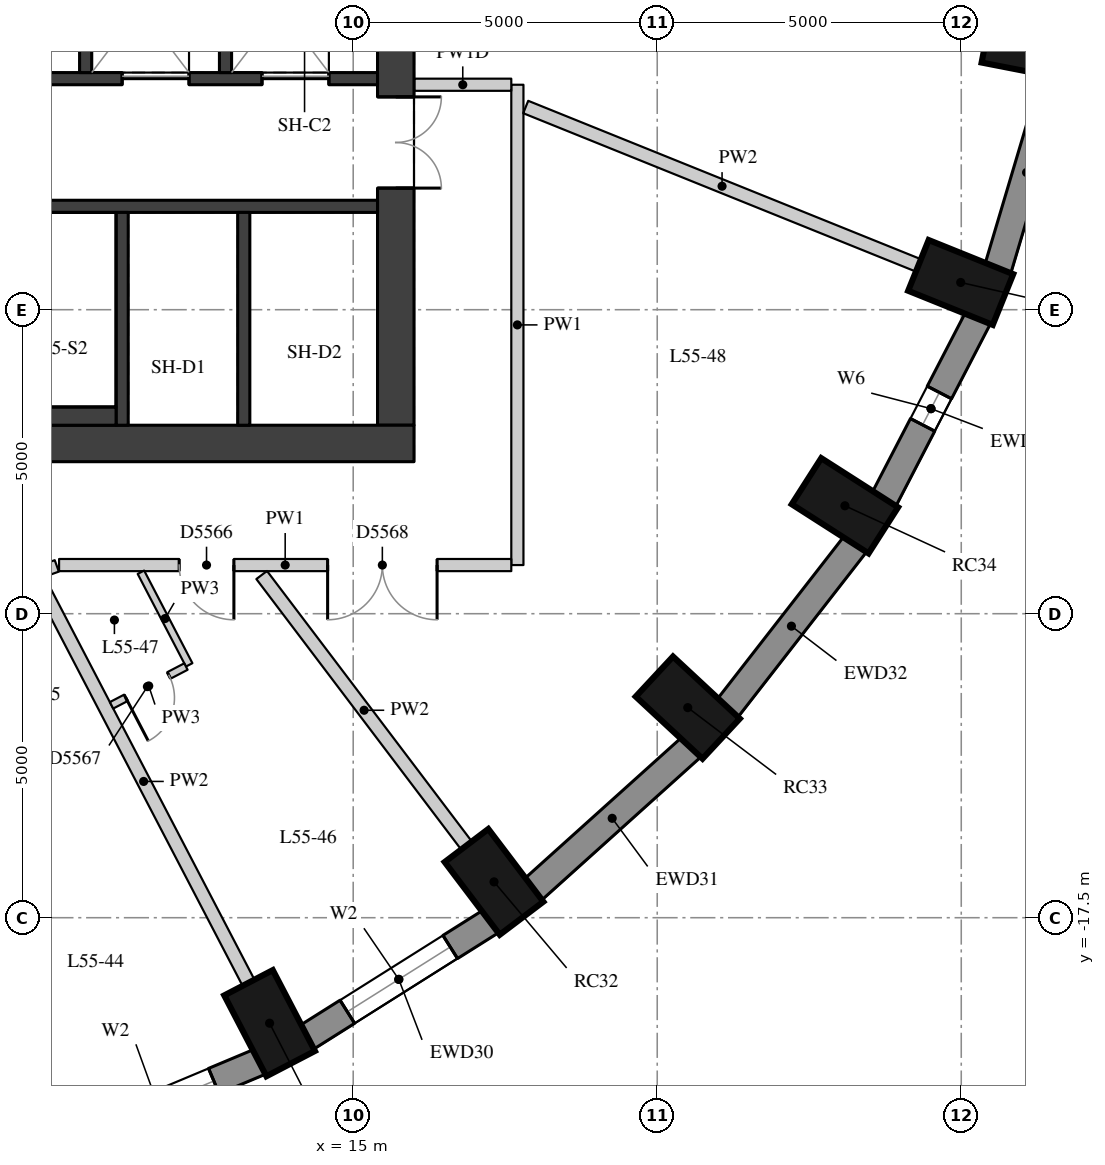
"""IFC4 building model, lengths in metres.
Left out: names, types, materials, properties, quantities, classifications, styles, units other than length and angle.
Written with IfcOpenShell. Run it as: python <this file> out.ifc"""

import sys

from ifc_helpers import new_model, si_unit, direction, frame, frame_2d, origin, origin_2d, place, context, subcontext, project, spatial, rectangle, extrude, element, fill, save


model = new_model("IFC4")
c1 = context("Model", 3, precision=1e-05, world=origin(), true_north=direction((0.0, 1.0)))
c2 = subcontext(c1, "Body", "Model", "MODEL_VIEW")
j1 = project(units=[si_unit("LENGTHUNIT", "METRE"), si_unit("PLANEANGLEUNIT", "RADIAN")], contexts=[c1])
p1 = place(None, origin())
s1 = spatial("IfcSite", under=j1, at=p1, CompositionType="ELEMENT")
p2 = place(p1, origin())
s2 = spatial("IfcBuilding", under=s1, at=p2, CompositionType="ELEMENT")
p3 = place(p2, frame((0.0, 0.0, 195.8)))
s3 = spatial("IfcBuildingStorey", under=s2, at=p3, CompositionType="ELEMENT", Elevation=195.8)
for number, where, z_axis, x_axis in (
    (1, (9.541, -20.948, 0.0), (0.0, 0.0, 1.0), (0.312, -0.95, 0.0)),
    (2, (13.625, -19.235, 0.0), (0.0, 0.0, 1.0), (0.462, -0.887, 0.0)),
    (3, (17.316, -16.911, 0.0), (0.0, 0.0, 1.0), (0.604, -0.797, 0.0)),
    (4, (20.502, -14.045, 0.0), (0.0, 0.0, 1.0), (0.732, -0.681, 0.0)),
    (5, (23.087, -10.725, 0.0), (0.0, 0.0, 1.0), (0.842, -0.539, 0.0)),
    (6, (24.991, -7.052, 0.0), (0.0, 0.0, 1.0), (0.927, -0.374, 0.0)),
    (7, (26.157, -3.137, 0.0), (0.0, 0.0, 1.0), (0.981, -0.192, 0.0)),
):
    element("IfcColumn", number, at=place(p3, frame(where, z_axis=z_axis, x_axis=x_axis)), inside=s3, PredefinedType="COLUMN", context=c2, shape_type="SweptSolid", body=[
        extrude(rectangle(XDim=1.5, YDim=0.9, at=origin_2d()), origin(), (0.0, 0.0, 1.0), 3.3),
    ])
p4 = place(p3, frame((10.103, -21.279, 0.0), z_axis=(0.0, 0.0, 1.0), x_axis=(0.922168222612, 0.386789050006, 0.0)))
e8 = element("IfcWall", 8, at=p4, inside=s3, PredefinedType="SOLIDWALL", context=c2, shape_type="SweptSolid", body=[
    extrude(rectangle(XDim=3.651, YDim=0.45, at=frame_2d((1.825, 0.0))), origin(), (0.0, 0.0, 1.0), 3.02),
])
p5 = place(p4, frame((0.825, 0.0, 0.4)))
e9 = element("IfcOpeningElement", 9, at=p5, cuts=e8, PredefinedType="OPENING", context=c2, shape_type="SweptSolid", body=[
    extrude(rectangle(XDim=2.0, YDim=1.75, at=frame_2d((1.0, 0.875))), frame((0.0, 0.235, 0.0), z_axis=(0.0, -1.0, 0.0), x_axis=(1.0, 0.0, 0.0)), (0.0, 0.0, 1.0), 0.47),
])
p6 = place(p3, frame((14.232, -19.47, 0.0), z_axis=(0.0, 0.0, 1.0), x_axis=(0.84614984472, 0.532945063098, 0.0)))
e10 = element("IfcWall", 10, at=p6, inside=s3, PredefinedType="SOLIDWALL", context=c2, shape_type="SweptSolid", body=[
    extrude(rectangle(XDim=3.586, YDim=0.45, at=frame_2d((1.793, 0.0))), origin(), (0.0, 0.0, 1.0), 3.02),
])
p7 = place(p6, frame((0.793, 0.0, 0.4)))
e11 = element("IfcOpeningElement", 11, at=p7, cuts=e10, PredefinedType="OPENING", context=c2, shape_type="SweptSolid", body=[
    extrude(rectangle(XDim=2.0, YDim=1.75, at=frame_2d((1.0, 0.875))), frame((0.0, 0.235, 0.0), z_axis=(0.0, -1.0, 0.0), x_axis=(1.0, 0.0, 0.0)), (0.0, 0.0, 1.0), 0.47),
])
p8 = place(p3, frame((17.953, -17.04, 0.0), z_axis=(0.0, 0.0, 1.0), x_axis=(0.743442727602, 0.668799604348, 0.0)))
e12 = element("IfcWall", 12, at=p8, inside=s3, PredefinedType="SOLIDWALL", context=c2, shape_type="SweptSolid", body=[
    extrude(rectangle(XDim=3.513, YDim=0.45, at=frame_2d((1.756, 0.0))), origin(), (0.0, 0.0, 1.0), 3.02),
])
p9 = place(p3, frame((21.151, -14.061, 0.0), z_axis=(0.0, 0.0, 1.0), x_axis=(0.614255239631, 0.789107407509, 0.0)))
e13 = element("IfcWall", 13, at=p9, inside=s3, PredefinedType="SOLIDWALL", context=c2, shape_type="SweptSolid", body=[
    extrude(rectangle(XDim=3.438, YDim=0.45, at=frame_2d((1.719, 0.0))), origin(), (0.0, 0.0, 1.0), 3.02),
])
p10 = place(p3, frame((23.727, -10.624, 0.0), z_axis=(0.0, 0.0, 1.0), x_axis=(0.460175500475, 0.887827972505, 0.0)))
e14 = element("IfcWall", 14, at=p10, inside=s3, PredefinedType="SOLIDWALL", context=c2, shape_type="SweptSolid", body=[
    extrude(rectangle(XDim=3.371, YDim=0.45, at=frame_2d((1.685, 0.0))), origin(), (0.0, 0.0, 1.0), 3.02),
])
p11 = place(p10, frame((1.385, 0.0, 0.4)))
e15 = element("IfcOpeningElement", 15, at=p11, cuts=e14, PredefinedType="OPENING", context=c2, shape_type="SweptSolid", body=[
    extrude(rectangle(XDim=0.6, YDim=1.75, at=frame_2d((0.3, 0.875))), frame((0.0, 0.235, 0.0), z_axis=(0.0, -1.0, 0.0), x_axis=(1.0, 0.0, 0.0)), (0.0, 0.0, 1.0), 0.47),
])
p12 = place(p3, frame((25.6, -6.834, 0.0), z_axis=(0.0, 0.0, 1.0), x_axis=(0.285444972963, 0.958395099847, 0.0)))
e16 = element("IfcWall", 16, at=p12, inside=s3, PredefinedType="SOLIDWALL", context=c2, shape_type="SweptSolid", body=[
    extrude(rectangle(XDim=3.32, YDim=0.45, at=frame_2d((1.66, 0.0))), origin(), (0.0, 0.0, 1.0), 3.02),
])
p13 = place(p3, frame((15.7, -9.4, 0.0), z_axis=(0.0, 0.0, 1.0), x_axis=(0.0, 1.0, 0.0)))
e17 = element("IfcWall", 17, at=p13, inside=s3, PredefinedType="SHEAR", context=c2, shape_type="SweptSolid", body=[
    extrude(rectangle(XDim=18.8, YDim=0.6, at=frame_2d((9.4, 0.0))), origin(), (0.0, 0.0, 1.0), 3.02),
])
p14 = place(p13, frame((13.4, 0.0, 0.0)))
e18 = element("IfcOpeningElement", 18, at=p14, cuts=e17, PredefinedType="OPENING", context=c2, shape_type="SweptSolid", body=[
    extrude(rectangle(XDim=1.5, YDim=2.1, at=frame_2d((0.75, 1.05))), frame((0.0, 0.31, 0.0), z_axis=(0.0, -1.0, 0.0), x_axis=(1.0, 0.0, 0.0)), (0.0, 0.0, 1.0), 0.62),
])
p15 = place(p13, frame((3.9, 0.0, 0.0)))
e19 = element("IfcOpeningElement", 19, at=p15, cuts=e17, PredefinedType="OPENING", context=c2, shape_type="SweptSolid", body=[
    extrude(rectangle(XDim=1.5, YDim=2.1, at=frame_2d((0.75, 1.05))), frame((0.0, 0.31, 0.0), z_axis=(0.0, -1.0, 0.0), x_axis=(1.0, 0.0, 0.0)), (0.0, 0.0, 1.0), 0.62),
])
p16 = place(p3, frame((4.0, -9.7, 0.0), z_axis=(0.0, 0.0, 1.0), x_axis=(1.0, 0.0, 0.0)))
e20 = element("IfcWall", 20, at=p16, inside=s3, PredefinedType="SHEAR", context=c2, shape_type="SweptSolid", body=[
    extrude(rectangle(XDim=12.0, YDim=0.6, at=frame_2d((6.0, 0.0))), origin(), (0.0, 0.0, 1.0), 3.02),
])
p17 = place(p3, frame((4.6, -3.7, 0.0), z_axis=(0.0, 0.0, 1.0), x_axis=(1.0, 0.0, 0.0)))
e21 = element("IfcWall", 21, at=p17, inside=s3, PredefinedType="SHEAR", context=c2, shape_type="SweptSolid", body=[
    extrude(rectangle(XDim=10.8, YDim=0.2, at=frame_2d((5.4, 0.0))), origin(), (0.0, 0.0, 1.0), 3.02),
])
p18 = place(p17, frame((6.6, 0.0, 0.0)))
e22 = element("IfcOpeningElement", 22, at=p18, cuts=e21, PredefinedType="OPENING", context=c2, shape_type="SweptSolid", body=[
    extrude(rectangle(XDim=1.1, YDim=2.1, at=frame_2d((0.55, 1.05))), frame((0.0, 0.11, 0.0), z_axis=(0.0, -1.0, 0.0), x_axis=(1.0, 0.0, 0.0)), (0.0, 0.0, 1.0), 0.22),
])
p19 = place(p17, frame((8.9, 0.0, 0.0)))
e23 = element("IfcOpeningElement", 23, at=p19, cuts=e21, PredefinedType="OPENING", context=c2, shape_type="SweptSolid", body=[
    extrude(rectangle(XDim=1.1, YDim=2.1, at=frame_2d((0.55, 1.05))), frame((0.0, 0.11, 0.0), z_axis=(0.0, -1.0, 0.0), x_axis=(1.0, 0.0, 0.0)), (0.0, 0.0, 1.0), 0.22),
])
p20 = place(p3, frame((4.6, -5.8, 0.0), z_axis=(0.0, 0.0, 1.0), x_axis=(1.0, 0.0, 0.0)))
e24 = element("IfcWall", 24, at=p20, inside=s3, PredefinedType="SHEAR", context=c2, shape_type="SweptSolid", body=[
    extrude(rectangle(XDim=10.8, YDim=0.2, at=frame_2d((5.4, 0.0))), origin(), (0.0, 0.0, 1.0), 3.02),
])
for number, where, z_axis, x_axis in (
    (25, (11.2, -9.4, 0.0), (0.0, 0.0, 1.0), (0.0, 1.0, 0.0)),
    (26, (13.2, -9.4, 0.0), (0.0, 0.0, 1.0), (0.0, 1.0, 0.0)),
):
    element("IfcWall", number, at=place(p3, frame(where, z_axis=z_axis, x_axis=x_axis)), inside=s3, PredefinedType="SHEAR", context=c2, shape_type="SweptSolid", body=[
        extrude(rectangle(XDim=3.5, YDim=0.2, at=frame_2d((1.75, 0.0))), origin(), (0.0, 0.0, 1.0), 3.02),
    ])
for number, where, z_axis, x_axis in (
    (27, (10.6, -3.6, 0.0), (0.0, 0.0, 1.0), (0.0, 1.0, 0.0)),
    (28, (12.9, -3.6, 0.0), (0.0, 0.0, 1.0), (0.0, 1.0, 0.0)),
):
    element("IfcWall", number, at=place(p3, frame(where, z_axis=z_axis, x_axis=x_axis)), inside=s3, PredefinedType="SHEAR", context=c2, shape_type="SweptSolid", body=[
        extrude(rectangle(XDim=2.5, YDim=0.2, at=frame_2d((1.25, 0.0))), origin(), (0.0, 0.0, 1.0), 3.02),
    ])
p21 = place(p3, frame((6.22, -9.25, 0.0), z_axis=(0.0, 0.0, 1.0), x_axis=(1.0, 0.0, 0.0)))
e29 = element("IfcWall", 29, at=p21, inside=s3, PredefinedType="PARTITIONING", context=c2, shape_type="SweptSolid", body=[
    extrude(rectangle(XDim=4.88, YDim=0.3, at=frame_2d((2.44, 0.0))), origin(), (0.0, 0.0, 1.0), 3.02),
])
p22 = place(p3, frame((17.7, -3.8, 0.0), z_axis=(0.0, 0.0, 1.0), x_axis=(0.0, -1.0, 0.0)))
e30 = element("IfcWall", 30, at=p22, inside=s3, PredefinedType="PARTITIONING", context=c2, shape_type="SweptSolid", body=[
    extrude(rectangle(XDim=7.9, YDim=0.2, at=frame_2d((3.95, 0.0))), origin(), (0.0, 0.0, 1.0), 3.02),
])
p23 = place(p3, frame((17.6, -11.7, 0.0), z_axis=(0.0, 0.0, 1.0), x_axis=(-1.0, 0.0, 0.0)))
e31 = element("IfcWall", 31, at=p23, inside=s3, PredefinedType="PARTITIONING", context=c2, shape_type="SweptSolid", body=[
    extrude(rectangle(XDim=7.437, YDim=0.2, at=frame_2d((3.719, 0.0))), origin(), (0.0, 0.0, 1.0), 3.02),
])
p24 = place(p23, frame((4.562, 0.0, 0.0)))
e32 = element("IfcOpeningElement", 32, at=p24, cuts=e31, PredefinedType="OPENING", context=c2, shape_type="SweptSolid", body=[
    extrude(rectangle(XDim=0.9, YDim=2.1, at=frame_2d((0.45, 1.05))), frame((0.0, 0.11, 0.0), z_axis=(0.0, -1.0, 0.0), x_axis=(1.0, 0.0, 0.0)), (0.0, 0.0, 1.0), 0.22),
])
p25 = place(p23, frame((1.22, 0.0, 0.0)))
e33 = element("IfcOpeningElement", 33, at=p25, cuts=e31, PredefinedType="OPENING", context=c2, shape_type="SweptSolid", body=[
    extrude(rectangle(XDim=1.8, YDim=2.1, at=frame_2d((0.9, 1.05))), frame((0.0, 0.11, 0.0), z_axis=(0.0, -1.0, 0.0), x_axis=(1.0, 0.0, 0.0)), (0.0, 0.0, 1.0), 0.22),
])
p26 = place(p3, frame((10.125, -11.714, 0.0), z_axis=(0.0, 0.0, 1.0), x_axis=(-0.940958661946, -0.338521486038, 0.0)))
e34 = element("IfcWall", 34, at=p26, inside=s3, PredefinedType="PARTITIONING", context=c2, shape_type="SweptSolid", body=[
    extrude(rectangle(XDim=6.594, YDim=0.2, at=frame_2d((3.297, 0.0))), origin(), (0.0, 0.0, 1.0), 3.02),
])
p27 = place(p26, frame((3.809, 0.0, 0.0)))
e35 = element("IfcOpeningElement", 35, at=p27, cuts=e34, PredefinedType="OPENING", context=c2, shape_type="SweptSolid", body=[
    extrude(rectangle(XDim=0.9, YDim=2.1, at=frame_2d((0.45, 1.05))), frame((0.0, 0.11, 0.0), z_axis=(0.0, -1.0, 0.0), x_axis=(1.0, 0.0, 0.0)), (0.0, 0.0, 1.0), 0.22),
])
p28 = place(p26, frame((0.706, 0.0, 0.0)))
e36 = element("IfcOpeningElement", 36, at=p28, cuts=e34, PredefinedType="OPENING", context=c2, shape_type="SweptSolid", body=[
    extrude(rectangle(XDim=0.9, YDim=2.1, at=frame_2d((0.45, 1.05))), frame((0.0, 0.11, 0.0), z_axis=(0.0, -1.0, 0.0), x_axis=(1.0, 0.0, 0.0)), (0.0, 0.0, 1.0), 0.22),
])
p29 = place(p3, frame((16.004, -3.8, 0.0), z_axis=(0.0, 0.0, 1.0), x_axis=(1.0, 0.0, 0.0)))
e37 = element("IfcWall", 37, at=p29, inside=s3, PredefinedType="PARTITIONING", context=c2, shape_type="SweptSolid", body=[
    extrude(rectangle(XDim=1.596, YDim=0.2, at=frame_2d((0.798, 0.0))), origin(), (0.0, 0.0, 1.0), 2.47),
])
p30 = place(p3, frame((13.279, -18.57, 0.0), z_axis=(0.0, 0.0, 1.0), x_axis=(-0.461996036885, 0.886881988712, 0.0)))
e38 = element("IfcWall", 38, at=p30, inside=s3, PredefinedType="PARTITIONING", context=c2, shape_type="SweptSolid", body=[
    extrude(rectangle(XDim=7.467, YDim=0.22, at=frame_2d((3.733, 0.0))), origin(), (0.0, 0.0, 1.0), 3.02),
])
p31 = place(p3, frame((16.863, -16.312, 0.0), z_axis=(0.0, 0.0, 1.0), x_axis=(-0.603626861738, 0.797266963939, 0.0)))
e39 = element("IfcWall", 39, at=p31, inside=s3, PredefinedType="PARTITIONING", context=c2, shape_type="SweptSolid", body=[
    extrude(rectangle(XDim=5.58, YDim=0.22, at=frame_2d((2.79, 0.0))), origin(), (0.0, 0.0, 1.0), 3.02),
])
p32 = place(p3, frame((24.295, -6.771, 0.0), z_axis=(0.0, 0.0, 1.0), x_axis=(-0.927387137769, 0.374103056256, 0.0)))
e40 = element("IfcWall", 40, at=p32, inside=s3, PredefinedType="PARTITIONING", context=c2, shape_type="SweptSolid", body=[
    extrude(rectangle(XDim=6.964, YDim=0.22, at=frame_2d((3.482, 0.0))), origin(), (0.0, 0.0, 1.0), 3.02),
])
p33 = place(p3, frame((11.509, -11.818, 0.0), z_axis=(0.0, 0.0, 1.0), x_axis=(0.461987980812, -0.886886185249, 0.0)))
e41 = element("IfcWall", 41, at=p33, inside=s3, PredefinedType="PARTITIONING", context=c2, shape_type="SweptSolid", body=[
    extrude(rectangle(XDim=1.718, YDim=0.12, at=frame_2d((0.859, 0.0))), origin(), (0.0, 0.0, 1.0), 3.02),
])
p34 = place(p3, frame((12.249, -13.369, 0.0), z_axis=(0.0, 0.0, 1.0), x_axis=(-0.886834011057, -0.462088126695, 0.0)))
e42 = element("IfcWall", 42, at=p34, inside=s3, PredefinedType="PARTITIONING", context=c2, shape_type="SweptSolid", body=[
    extrude(rectangle(XDim=1.379, YDim=0.12, at=frame_2d((0.69, 0.0))), origin(), (0.0, 0.0, 1.0), 3.02),
])
p35 = place(p34, frame((0.315, 0.0, 0.0)))
e43 = element("IfcOpeningElement", 43, at=p35, cuts=e42, PredefinedType="OPENING", context=c2, shape_type="SweptSolid", body=[
    extrude(rectangle(XDim=0.8, YDim=2.1, at=frame_2d((0.4, 1.05))), frame((0.0, 0.07, 0.0), z_axis=(0.0, -1.0, 0.0), x_axis=(1.0, 0.0, 0.0)), (0.0, 0.0, 1.0), 0.14),
])
p36 = place(p5, origin())
e44 = element("IfcWindow", 44, at=p36, inside=s3, PartitioningType="SINGLE_PANEL", PredefinedType="WINDOW", context=c2, shape_type="SweptSolid", body=[
    extrude(rectangle(XDim=2.0, YDim=1.75, at=frame_2d((1.0, 0.875))), frame((0.0, 0.035, 0.0), z_axis=(0.0, -1.0, 0.0), x_axis=(1.0, 0.0, 0.0)), (0.0, 0.0, 1.0), 0.06),
])
fill(e9, e44)
p37 = place(p7, origin())
e45 = element("IfcWindow", 45, at=p37, inside=s3, PartitioningType="SINGLE_PANEL", PredefinedType="WINDOW", context=c2, shape_type="SweptSolid", body=[
    extrude(rectangle(XDim=2.0, YDim=1.75, at=frame_2d((1.0, 0.875))), frame((0.0, 0.035, 0.0), z_axis=(0.0, -1.0, 0.0), x_axis=(1.0, 0.0, 0.0)), (0.0, 0.0, 1.0), 0.06),
])
fill(e11, e45)
p38 = place(p11, origin())
e46 = element("IfcWindow", 46, at=p38, inside=s3, PartitioningType="SINGLE_PANEL", PredefinedType="WINDOW", context=c2, shape_type="SweptSolid", body=[
    extrude(rectangle(XDim=0.6, YDim=1.75, at=frame_2d((0.3, 0.875))), frame((0.0, 0.035, 0.0), z_axis=(0.0, -1.0, 0.0), x_axis=(1.0, 0.0, 0.0)), (0.0, 0.0, 1.0), 0.06),
])
fill(e15, e46)
p39 = place(p15, origin())
e47 = element("IfcDoor", 47, at=p39, inside=s3, OperationType="DOUBLE_DOOR_SINGLE_SWING", PredefinedType="DOOR", context=c2, shape_type="SweptSolid", body=[
    extrude(rectangle(XDim=1.5, YDim=2.1, at=frame_2d((0.75, 1.05))), frame((0.0, 0.025, 0.0), z_axis=(0.0, -1.0, 0.0), x_axis=(1.0, 0.0, 0.0)), (0.0, 0.0, 1.0), 0.05),
])
fill(e19, e47)
p40 = place(p18, origin())
e48 = element("IfcDoor", 48, at=p40, inside=s3, OperationType="DOUBLE_DOOR_SLIDING", PredefinedType="DOOR", context=c2, shape_type="SweptSolid", body=[
    extrude(rectangle(XDim=1.1, YDim=2.1, at=frame_2d((0.55, 1.05))), frame((0.0, 0.025, 0.0), z_axis=(0.0, -1.0, 0.0), x_axis=(1.0, 0.0, 0.0)), (0.0, 0.0, 1.0), 0.05),
])
fill(e22, e48)
p41 = place(p19, origin())
e49 = element("IfcDoor", 49, at=p41, inside=s3, OperationType="DOUBLE_DOOR_SLIDING", PredefinedType="DOOR", context=c2, shape_type="SweptSolid", body=[
    extrude(rectangle(XDim=1.1, YDim=2.1, at=frame_2d((0.55, 1.05))), frame((0.0, 0.025, 0.0), z_axis=(0.0, -1.0, 0.0), x_axis=(1.0, 0.0, 0.0)), (0.0, 0.0, 1.0), 0.05),
])
fill(e23, e49)
p42 = place(p24, origin())
e50 = element("IfcDoor", 50, at=p42, inside=s3, OperationType="SINGLE_SWING_LEFT", PredefinedType="DOOR", context=c2, shape_type="SweptSolid", body=[
    extrude(rectangle(XDim=0.9, YDim=2.1, at=frame_2d((0.45, 1.05))), frame((0.0, 0.025, 0.0), z_axis=(0.0, -1.0, 0.0), x_axis=(1.0, 0.0, 0.0)), (0.0, 0.0, 1.0), 0.05),
])
fill(e32, e50)
p43 = place(p35, origin())
e51 = element("IfcDoor", 51, at=p43, inside=s3, OperationType="SINGLE_SWING_RIGHT", PredefinedType="DOOR", context=c2, shape_type="SweptSolid", body=[
    extrude(rectangle(XDim=0.8, YDim=2.1, at=frame_2d((0.4, 1.05))), frame((0.0, 0.025, 0.0), z_axis=(0.0, -1.0, 0.0), x_axis=(1.0, 0.0, 0.0)), (0.0, 0.0, 1.0), 0.05),
])
fill(e43, e51)
p44 = place(p25, origin())
e52 = element("IfcDoor", 52, at=p44, inside=s3, OperationType="DOUBLE_DOOR_SINGLE_SWING", PredefinedType="DOOR", context=c2, shape_type="SweptSolid", body=[
    extrude(rectangle(XDim=1.8, YDim=2.1, at=frame_2d((0.9, 1.05))), frame((0.0, 0.025, 0.0), z_axis=(0.0, -1.0, 0.0), x_axis=(1.0, 0.0, 0.0)), (0.0, 0.0, 1.0), 0.05),
])
fill(e33, e52)
save(model, sys.argv[1])
